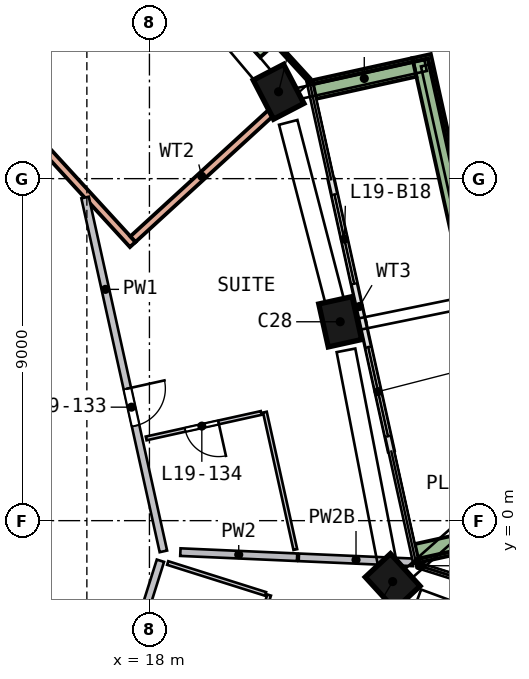
"""IFC4 building model, lengths in metres.
Left out: names, types, materials, properties, quantities, classifications, styles, units other than length and angle.
Written with IfcOpenShell. Run it as: python <this file> out.ifc"""

import sys

from ifc_helpers import new_model, si_unit, direction, frame, frame_2d, origin, origin_2d, place, context, subcontext, project, spatial, rectangle, extrude, element, fill, save


model = new_model("IFC4")
c1 = context("Model", 3, precision=1e-05, world=origin(), true_north=direction((0.0, 1.0)))
c2 = subcontext(c1, "Body", "Model", "MODEL_VIEW")
j1 = project(units=[si_unit("LENGTHUNIT", "METRE"), si_unit("PLANEANGLEUNIT", "RADIAN")], contexts=[c1])
p1 = place(None, origin())
s1 = spatial("IfcSite", under=j1, at=p1, CompositionType="ELEMENT")
p2 = place(p1, origin())
s2 = spatial("IfcBuilding", under=s1, at=p2, CompositionType="ELEMENT")
p3 = place(p2, frame((0.0, 0.0, 86.0)))
s3 = spatial("IfcBuildingStorey", under=s2, at=p3, CompositionType="ELEMENT", Elevation=86.0)
p4 = place(p3, frame((24.392, -1.744, 0.0), z_axis=(0.007297516, 0.116000105, 0.993222393), x_axis=(0.678248384, -0.730429368, 0.080324764)))
e1 = element("IfcColumn", 1, at=p4, inside=s3, PredefinedType="COLUMN", context=c2, shape_type="SweptSolid", body=[
    extrude(rectangle(XDim=1.15, YDim=0.9, at=origin_2d()), origin(), (0.0, 0.0, 1.0), 3.212),
])
p5 = place(p3, frame((23.051, 5.102, 0.0), z_axis=(-0.025248696, 0.109436366, 0.993673078), x_axis=(-0.215163997, 0.970098725, -0.112307249)))
e2 = element("IfcColumn", 2, at=p5, inside=s3, PredefinedType="COLUMN", context=c2, shape_type="SweptSolid", body=[
    extrude(rectangle(XDim=1.15, YDim=0.9, at=origin_2d()), origin(), (0.0, 0.0, 1.0), 3.21),
])
p6 = place(p3, frame((21.463, 11.163, 0.0), z_axis=(-0.053978424, 0.101646695, 0.993355062), x_axis=(0.458428957, -0.881248043, 0.115085963)))
e3 = element("IfcColumn", 3, at=p6, inside=s3, PredefinedType="COLUMN", context=c2, shape_type="SweptSolid", body=[
    extrude(rectangle(XDim=1.15, YDim=0.9, at=origin_2d()), origin(), (0.0, 0.0, 1.0), 3.211),
])
p7 = place(p3, frame((24.363, 1.833, 0.0), z_axis=(0.0, 0.0, 1.0), x_axis=(-0.216097265, 0.976371841, 0.0)))
e4 = element("IfcWall", 4, at=p7, inside=s3, PredefinedType="SOLIDWALL", context=c2, shape_type="SweptSolid", body=[
    extrude(rectangle(XDim=3.475, YDim=0.15, at=frame_2d((1.738, 0.0))), origin(), (0.0, 0.0, 1.0), 2.425),
])
p8 = place(p7, frame((0.4, 0.0, 0.0)))
e5 = element("IfcOpeningElement", 5, at=p8, cuts=e4, PredefinedType="OPENING", context=c2, shape_type="SweptSolid", body=[
    extrude(rectangle(XDim=2.4, YDim=2.4, at=frame_2d((1.2, 1.2))), frame((0.0, 0.085, 0.0), z_axis=(0.0, -1.0, 0.0), x_axis=(1.0, 0.0, 0.0)), (0.0, 0.0, 1.0), 0.17),
])
p9 = place(p3, frame((23.612, 5.226, 0.0), z_axis=(0.0, 0.0, 1.0), x_axis=(-0.216101395, 0.976370927, 0.0)))
e6 = element("IfcWall", 6, at=p9, inside=s3, PredefinedType="SOLIDWALL", context=c2, shape_type="SweptSolid", body=[
    extrude(rectangle(XDim=3.835, YDim=0.15, at=frame_2d((1.918, 0.0))), origin(), (0.0, 0.0, 1.0), 2.425),
])
p10 = place(p9, frame((1.035, 0.0, 0.0)))
e7 = element("IfcOpeningElement", 7, at=p10, cuts=e6, PredefinedType="OPENING", context=c2, shape_type="SweptSolid", body=[
    extrude(rectangle(XDim=2.4, YDim=2.4, at=frame_2d((1.2, 1.2))), frame((0.0, 0.085, 0.0), z_axis=(0.0, -1.0, 0.0), x_axis=(1.0, 0.0, 0.0)), (0.0, 0.0, 1.0), 0.17),
])
p11 = place(p3, frame((25.037, -0.86, 0.0), z_axis=(0.0, 0.0, 1.0), x_axis=(0.97638239, 0.216049597, 0.0)))
e8 = element("IfcWall", 8, at=p11, inside=s3, PredefinedType="SOLIDWALL", context=c2, shape_type="SweptSolid", body=[
    extrude(rectangle(XDim=3.199, YDim=0.5, at=frame_2d((1.6, 0.0))), origin(), (0.0, 0.0, 1.0), 0.7),
])
p12 = place(p3, frame((27.862, 0.021, 0.0), z_axis=(0.0, 0.0, 1.0), x_axis=(-0.216094896, 0.976372365, 0.0)))
e9 = element("IfcWall", 9, at=p12, inside=s3, PredefinedType="SOLIDWALL", context=c2, shape_type="SweptSolid", body=[
    extrude(rectangle(XDim=12.5, YDim=0.5, at=frame_2d((6.25, 0.0))), origin(), (0.0, 0.0, 1.0), 0.7),
])
p13 = place(p3, frame((24.971, 11.928, 0.0), z_axis=(0.0, 0.0, 1.0), x_axis=(-0.976371871, -0.216097128, 0.0)))
e10 = element("IfcWall", 10, at=p13, inside=s3, PredefinedType="SOLIDWALL", context=c2, shape_type="SweptSolid", body=[
    extrude(rectangle(XDim=2.699, YDim=0.5, at=frame_2d((1.35, 0.0))), origin(), (0.0, 0.0, 1.0), 0.7),
])
p14 = place(p3, frame((8.781, 16.854, 0.0), z_axis=(0.0, 0.0, 1.0), x_axis=(0.675332489, -0.737513409, 0.0)))
e11 = element("IfcWall", 11, at=p14, inside=s3, PredefinedType="SOLIDWALL", context=c2, shape_type="SweptSolid", body=[
    extrude(rectangle(XDim=13.0, YDim=0.2, at=frame_2d((6.5, 0.0))), origin(), (0.0, 0.0, 1.0), 3.19),
])
p15 = place(p14, frame((5.6, 0.0, 0.0)))
e12 = element("IfcOpeningElement", 12, at=p15, cuts=e11, PredefinedType="OPENING", context=c2, shape_type="SweptSolid", body=[
    extrude(rectangle(XDim=1.8, YDim=2.4, at=frame_2d((0.9, 1.2))), frame((0.0, 0.11, 0.0), z_axis=(0.0, -1.0, 0.0), x_axis=(1.0, 0.0, 0.0)), (0.0, 0.0, 1.0), 0.22),
])
p16 = place(p3, frame((21.184, 10.72, 0.0), z_axis=(0.0, 0.0, 1.0), x_axis=(-0.737511524, -0.675334548, 0.0)))
e13 = element("IfcWall", 13, at=p16, inside=s3, PredefinedType="SOLIDWALL", context=c2, shape_type="SweptSolid", body=[
    extrude(rectangle(XDim=4.904, YDim=0.2, at=frame_2d((2.452, 0.0))), origin(), (0.0, 0.0, 1.0), 3.19),
])
p17 = place(p3, frame((22.19, 11.614, 0.0), z_axis=(0.0, 0.0, 1.0), x_axis=(-0.675335359, 0.737510781, 0.0)))
e14 = element("IfcWall", 14, at=p17, inside=s3, PredefinedType="SOLIDWALL", context=c2, shape_type="SweptSolid", body=[
    extrude(rectangle(XDim=12.84, YDim=0.1, at=frame_2d((6.42, 0.0))), origin(), (0.0, 0.0, 1.0), 0.7),
])
p18 = place(p3, frame((21.099, 12.361, 0.0), z_axis=(0.0, 0.0, 1.0), x_axis=(-0.675337587, 0.737508741, 0.0)))
e15 = element("IfcWall", 15, at=p18, inside=s3, PredefinedType="SOLIDWALL", context=c2, shape_type="SweptSolid", body=[
    extrude(rectangle(XDim=4.457, YDim=0.5, at=frame_2d((2.229, 0.0))), origin(), (0.0, 0.0, 1.0), 0.7),
])
p19 = place(p3, frame((16.306, 8.503, 0.0), z_axis=(0.0, 0.0, 1.0), x_axis=(0.216092794, -0.976372831, 0.0)))
e16 = element("IfcWall", 16, at=p19, inside=s3, PredefinedType="SOLIDWALL", context=c2, shape_type="SweptSolid", body=[
    extrude(rectangle(XDim=9.537, YDim=0.2, at=frame_2d((4.768, 0.0))), origin(), (0.0, 0.0, 1.0), 3.19),
])
p20 = place(p19, frame((5.15, 0.0, 0.0)))
e17 = element("IfcOpeningElement", 17, at=p20, cuts=e16, PredefinedType="OPENING", context=c2, shape_type="SweptSolid", body=[
    extrude(rectangle(XDim=1.0, YDim=2.1, at=frame_2d((0.5, 1.05))), frame((0.0, 0.11, 0.0), z_axis=(0.0, -1.0, 0.0), x_axis=(1.0, 0.0, 0.0)), (0.0, 0.0, 1.0), 0.22),
])
p21 = place(p3, frame((17.266, -4.297, 0.0), z_axis=(0.0, 0.0, 1.0), x_axis=(0.301066076, 0.953603281, 0.0)))
e18 = element("IfcWall", 18, at=p21, inside=s3, PredefinedType="SOLIDWALL", context=c2, shape_type="SweptSolid", body=[
    extrude(rectangle(XDim=3.4, YDim=0.2, at=frame_2d((1.7, 0.0))), origin(), (0.0, 0.0, 1.0), 3.19),
])
p22 = place(p3, frame((18.814, -0.828, 0.0), z_axis=(0.0, 0.0, 1.0), x_axis=(0.999032036, -0.043988535, 0.0)))
e19 = element("IfcWall", 19, at=p22, inside=s3, PredefinedType="SOLIDWALL", context=c2, shape_type="SweptSolid", body=[
    extrude(rectangle(XDim=3.075, YDim=0.2, at=frame_2d((1.537, 0.0))), origin(), (0.0, 0.0, 1.0), 3.19),
])
p23 = place(p3, frame((21.931, -0.965, 0.0), z_axis=(0.0, 0.0, 1.0), x_axis=(0.999030596, -0.04402123, 0.0)))
e20 = element("IfcWall", 20, at=p23, inside=s3, PredefinedType="SOLIDWALL", context=c2, shape_type="SweptSolid", body=[
    extrude(rectangle(XDim=3.011, YDim=0.2, at=frame_2d((1.506, 0.0))), origin(), (0.0, 0.0, 1.0), 2.69),
])
p24 = place(p3, frame((20.941, 2.834, 0.0), z_axis=(0.0, 0.0, 1.0), x_axis=(-0.976368326, -0.216113147, 0.0)))
e21 = element("IfcWall", 21, at=p24, inside=s3, PredefinedType="PARTITIONING", context=c2, shape_type="SweptSolid", body=[
    extrude(rectangle(XDim=3.1, YDim=0.1, at=frame_2d((1.55, 0.0))), origin(), (0.0, 0.0, 1.0), 3.19),
])
p25 = place(p24, frame((1.15, 0.0, 0.0)))
e22 = element("IfcOpeningElement", 22, at=p25, cuts=e21, PredefinedType="OPENING", context=c2, shape_type="SweptSolid", body=[
    extrude(rectangle(XDim=0.9, YDim=2.1, at=frame_2d((0.45, 1.05))), frame((0.0, 0.06, 0.0), z_axis=(0.0, -1.0, 0.0), x_axis=(1.0, 0.0, 0.0)), (0.0, 0.0, 1.0), 0.12),
])
p26 = place(p3, frame((21.055, -1.928, 0.0), z_axis=(0.0, 0.0, 1.0), x_axis=(-0.953616824, 0.301023175, 0.0)))
e23 = element("IfcWall", 23, at=p26, inside=s3, PredefinedType="PARTITIONING", context=c2, shape_type="SweptSolid", body=[
    extrude(rectangle(XDim=2.7, YDim=0.1, at=frame_2d((1.35, 0.0))), origin(), (0.0, 0.0, 1.0), 3.19),
])
p27 = place(p3, frame((20.187, -5.01, 0.0), z_axis=(0.0, 0.0, 1.0), x_axis=(0.301036438, 0.953612638, 0.0)))
e24 = element("IfcWall", 24, at=p27, inside=s3, PredefinedType="PARTITIONING", context=c2, shape_type="SweptSolid", body=[
    extrude(rectangle(XDim=3.2, YDim=0.1, at=frame_2d((1.6, 0.0))), origin(), (0.0, 0.0, 1.0), 3.19),
])
p28 = place(p27, frame((1.05, 0.0, 0.0)))
e25 = element("IfcOpeningElement", 25, at=p28, cuts=e24, PredefinedType="OPENING", context=c2, shape_type="SweptSolid", body=[
    extrude(rectangle(XDim=0.9, YDim=2.1, at=frame_2d((0.45, 1.05))), frame((0.0, 0.06, 0.0), z_axis=(0.0, -1.0, 0.0), x_axis=(1.0, 0.0, 0.0)), (0.0, 0.0, 1.0), 0.12),
])
p29 = place(p3, frame((21.038, 2.855, 0.0), z_axis=(0.0, 0.0, 1.0), x_axis=(0.2161278, -0.976365082, 0.0)))
e26 = element("IfcWall", 26, at=p29, inside=s3, PredefinedType="PARTITIONING", context=c2, shape_type="SweptSolid", body=[
    extrude(rectangle(XDim=3.704, YDim=0.1, at=frame_2d((1.852, 0.0))), origin(), (0.0, 0.0, 1.0), 3.19),
])
p30 = place(p8, origin())
e27 = element("IfcDoor", 27, at=p30, inside=s3, OperationType="SLIDING_TO_RIGHT", PredefinedType="DOOR", context=c2, shape_type="SweptSolid", body=[
    extrude(rectangle(XDim=2.4, YDim=2.4, at=frame_2d((1.2, 1.2))), frame((0.0, 0.025, 0.0), z_axis=(0.0, -1.0, 0.0), x_axis=(1.0, 0.0, 0.0)), (0.0, 0.0, 1.0), 0.05),
])
fill(e5, e27)
p31 = place(p10, origin())
e28 = element("IfcDoor", 28, at=p31, inside=s3, OperationType="SLIDING_TO_LEFT", PredefinedType="DOOR", context=c2, shape_type="SweptSolid", body=[
    extrude(rectangle(XDim=2.4, YDim=2.4, at=frame_2d((1.2, 1.2))), frame((0.0, 0.025, 0.0), z_axis=(0.0, -1.0, 0.0), x_axis=(1.0, 0.0, 0.0)), (0.0, 0.0, 1.0), 0.05),
])
fill(e7, e28)
p32 = place(p20, origin())
e29 = element("IfcDoor", 29, at=p32, inside=s3, OperationType="SINGLE_SWING_LEFT", PredefinedType="DOOR", context=c2, shape_type="SweptSolid", body=[
    extrude(rectangle(XDim=1.0, YDim=2.1, at=frame_2d((0.5, 1.05))), frame((0.0, 0.025, 0.0), z_axis=(0.0, -1.0, 0.0), x_axis=(1.0, 0.0, 0.0)), (0.0, 0.0, 1.0), 0.05),
])
fill(e17, e29)
p33 = place(p25, origin())
e30 = element("IfcDoor", 30, at=p33, inside=s3, OperationType="SINGLE_SWING_LEFT", PredefinedType="DOOR", context=c2, shape_type="SweptSolid", body=[
    extrude(rectangle(XDim=0.9, YDim=2.1, at=frame_2d((0.45, 1.05))), frame((0.0, 0.025, 0.0), z_axis=(0.0, -1.0, 0.0), x_axis=(1.0, 0.0, 0.0)), (0.0, 0.0, 1.0), 0.05),
])
fill(e22, e30)
save(model, sys.argv[1])
